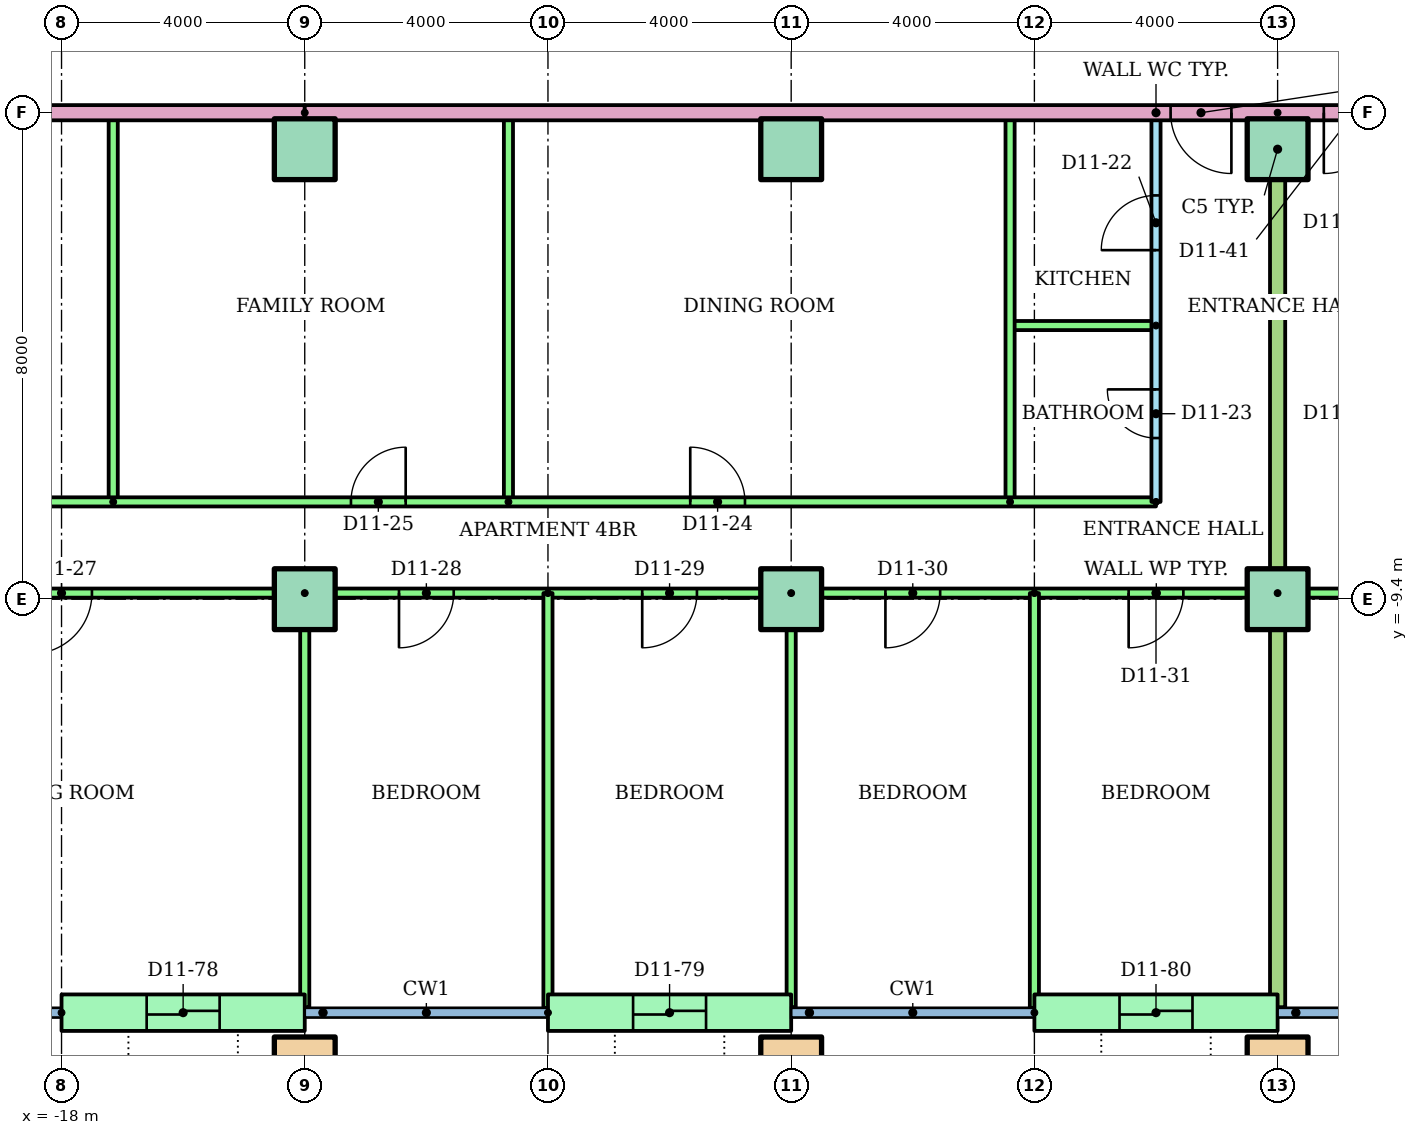
"""IFC4 building model, lengths in metres.
Left out: names, types, materials, properties, quantities, classifications, styles, units other than length and angle.
Written with IfcOpenShell. Run it as: python <this file> out.ifc"""

import sys

from ifc_helpers import new_model, si_unit, direction, frame, frame_2d, origin, origin_2d, place, context, subcontext, project, spatial, rectangle, hollow_rectangle, extrude, element, fill, save


model = new_model("IFC4")
c1 = context("Model", 3, precision=1e-05, world=origin(), true_north=direction((0.0, 1.0)))
c2 = subcontext(c1, "Body", "Model", "MODEL_VIEW")
j1 = project(units=[si_unit("LENGTHUNIT", "METRE"), si_unit("PLANEANGLEUNIT", "RADIAN")], contexts=[c1])
p1 = place(None, origin())
s1 = spatial("IfcSite", under=j1, at=p1, CompositionType="ELEMENT")
p2 = place(p1, origin())
s2 = spatial("IfcBuilding", under=s1, at=p2, CompositionType="ELEMENT")
p3 = place(p2, frame((0.0, 0.0, 44.8)))
s3 = spatial("IfcBuildingStorey", under=s2, at=p3, CompositionType="ELEMENT", Elevation=44.8)
for number, where in (
    (1, (-14.0, -17.1, 0.0)),
    (2, (-6.0, -17.1, 0.0)),
    (3, (2.0, -17.1, 0.0)),
):
    element("IfcColumn", number, at=place(p3, frame(where)), inside=s3, PredefinedType="COLUMN", context=c2, shape_type="SweptSolid", body=[
        extrude(hollow_rectangle(XDim=1.0, YDim=1.0, WallThickness=0.05, at=origin_2d()), origin(), (0.0, 0.0, 1.0), 3.2),
    ])
for number, where in (
    (4, (-14.0, -9.4, 0.0)),
    (5, (-6.0, -9.4, 0.0)),
    (6, (2.0, -9.4, 0.0)),
    (7, (-14.0, -2.0, 0.0)),
    (8, (-6.0, -2.0, 0.0)),
    (9, (2.0, -2.0, 0.0)),
):
    element("IfcColumn", number, at=place(p3, frame(where)), inside=s3, PredefinedType="COLUMN", context=c2, shape_type="SweptSolid", body=[
        extrude(rectangle(XDim=1.0, YDim=1.0, at=origin_2d()), origin(), (0.0, 0.0, 1.0), 3.2),
    ])
p4 = place(p3, frame((-18.0, -16.2, 0.0)))
e10 = element("IfcWall", 10, at=p4, inside=s3, PredefinedType="STANDARD", context=c2, shape_type="SweptSolid", body=[
    extrude(rectangle(XDim=4.0, YDim=0.6, at=frame_2d((2.0, 0.0))), origin(), (0.0, 0.0, 1.0), 2.92),
])
p5 = place(p4, frame((1.4, 0.0, 0.0)))
e11 = element("IfcOpeningElement", 11, at=p5, cuts=e10, PredefinedType="OPENING", context=c2, shape_type="SweptSolid", body=[
    extrude(rectangle(XDim=1.2, YDim=2.1, at=frame_2d((0.6, 1.05))), frame((0.0, 0.31, 0.0), z_axis=(0.0, -1.0, 0.0), x_axis=(1.0, 0.0, 0.0)), (0.0, 0.0, 1.0), 0.62),
])
p6 = place(p3, frame((-10.0, -16.2, 0.0)))
e12 = element("IfcWall", 12, at=p6, inside=s3, PredefinedType="STANDARD", context=c2, shape_type="SweptSolid", body=[
    extrude(rectangle(XDim=4.0, YDim=0.6, at=frame_2d((2.0, 0.0))), origin(), (0.0, 0.0, 1.0), 2.92),
])
p7 = place(p6, frame((1.4, 0.0, 0.0)))
e13 = element("IfcOpeningElement", 13, at=p7, cuts=e12, PredefinedType="OPENING", context=c2, shape_type="SweptSolid", body=[
    extrude(rectangle(XDim=1.2, YDim=2.1, at=frame_2d((0.6, 1.05))), frame((0.0, 0.31, 0.0), z_axis=(0.0, -1.0, 0.0), x_axis=(1.0, 0.0, 0.0)), (0.0, 0.0, 1.0), 0.62),
])
p8 = place(p3, frame((-2.0, -16.2, 0.0)))
e14 = element("IfcWall", 14, at=p8, inside=s3, PredefinedType="STANDARD", context=c2, shape_type="SweptSolid", body=[
    extrude(rectangle(XDim=4.0, YDim=0.6, at=frame_2d((2.0, 0.0))), origin(), (0.0, 0.0, 1.0), 2.92),
])
p9 = place(p8, frame((1.4, 0.0, 0.0)))
e15 = element("IfcOpeningElement", 15, at=p9, cuts=e14, PredefinedType="OPENING", context=c2, shape_type="SweptSolid", body=[
    extrude(rectangle(XDim=1.2, YDim=2.1, at=frame_2d((0.6, 1.05))), frame((0.0, 0.31, 0.0), z_axis=(0.0, -1.0, 0.0), x_axis=(1.0, 0.0, 0.0)), (0.0, 0.0, 1.0), 0.62),
])
p10 = place(p3, frame((0.0, -7.8, 0.0), z_axis=(0.0, 0.0, 1.0), x_axis=(0.0, 1.0, 0.0)))
e16 = element("IfcWall", 16, at=p10, inside=s3, PredefinedType="PARTITIONING", context=c2, shape_type="SweptSolid", body=[
    extrude(rectangle(XDim=6.4, YDim=0.15, at=frame_2d((3.2, 0.0))), origin(), (0.0, 0.0, 1.0), 2.4),
])
p11 = place(p10, frame((4.14, 0.0, 0.0)))
e17 = element("IfcOpeningElement", 17, at=p11, cuts=e16, PredefinedType="OPENING", context=c2, shape_type="SweptSolid", body=[
    extrude(rectangle(XDim=0.9, YDim=2.1, at=frame_2d((0.45, 1.05))), frame((0.0, 0.085, 0.0), z_axis=(0.0, -1.0, 0.0), x_axis=(1.0, 0.0, 0.0)), (0.0, 0.0, 1.0), 0.17),
])
p12 = place(p10, frame((1.05, 0.0, 0.0)))
e18 = element("IfcOpeningElement", 18, at=p12, cuts=e16, PredefinedType="OPENING", context=c2, shape_type="SweptSolid", body=[
    extrude(rectangle(XDim=0.8, YDim=2.1, at=frame_2d((0.4, 1.05))), frame((0.0, 0.085, 0.0), z_axis=(0.0, -1.0, 0.0), x_axis=(1.0, 0.0, 0.0)), (0.0, 0.0, 1.0), 0.17),
])
p13 = place(p3, frame((0.0, -4.9, 0.0), z_axis=(0.0, 0.0, 1.0), x_axis=(-1.0, 0.0, 0.0)))
e19 = element("IfcWall", 19, at=p13, inside=s3, PredefinedType="PARTITIONING", context=c2, shape_type="SweptSolid", body=[
    extrude(rectangle(XDim=2.4, YDim=0.15, at=frame_2d((1.2, 0.0))), origin(), (0.0, 0.0, 1.0), 2.4),
])
for number, where, z_axis, x_axis in (
    (20, (-2.4, -7.8, 0.0), (0.0, 0.0, 1.0), (0.0, 1.0, 0.0)),
    (21, (-10.65, -7.8, 0.0), (0.0, 0.0, 1.0), (0.0, 1.0, 0.0)),
    (22, (-17.15, -7.8, 0.0), (0.0, 0.0, 1.0), (0.0, 1.0, 0.0)),
):
    element("IfcWall", number, at=place(p3, frame(where, z_axis=z_axis, x_axis=x_axis)), inside=s3, PredefinedType="PARTITIONING", context=c2, shape_type="SweptSolid", body=[
        extrude(rectangle(XDim=6.4, YDim=0.15, at=frame_2d((3.2, 0.0))), origin(), (0.0, 0.0, 1.0), 2.4),
    ])
p14 = place(p3, frame((-22.0, -7.8, 0.0)))
e23 = element("IfcWall", 23, at=p14, inside=s3, PredefinedType="PARTITIONING", context=c2, shape_type="SweptSolid", body=[
    extrude(rectangle(XDim=22.0, YDim=0.15, at=frame_2d((11.0, 0.0))), origin(), (0.0, 0.0, 1.0), 2.4),
])
p15 = place(p14, frame((14.34, 0.0, 0.0)))
e24 = element("IfcOpeningElement", 24, at=p15, cuts=e23, PredefinedType="OPENING", context=c2, shape_type="SweptSolid", body=[
    extrude(rectangle(XDim=0.9, YDim=2.1, at=frame_2d((0.45, 1.05))), frame((0.0, 0.085, 0.0), z_axis=(0.0, -1.0, 0.0), x_axis=(1.0, 0.0, 0.0)), (0.0, 0.0, 1.0), 0.17),
])
p16 = place(p14, frame((8.76, 0.0, 0.0)))
e25 = element("IfcOpeningElement", 25, at=p16, cuts=e23, PredefinedType="OPENING", context=c2, shape_type="SweptSolid", body=[
    extrude(rectangle(XDim=0.9, YDim=2.1, at=frame_2d((0.45, 1.05))), frame((0.0, 0.085, 0.0), z_axis=(0.0, -1.0, 0.0), x_axis=(1.0, 0.0, 0.0)), (0.0, 0.0, 1.0), 0.17),
])
p17 = place(p14, frame((1.975, 0.0, 0.0)))
e26 = element("IfcOpeningElement", 26, at=p17, cuts=e23, PredefinedType="OPENING", context=c2, shape_type="SweptSolid", body=[
    extrude(rectangle(XDim=0.9, YDim=2.1, at=frame_2d((0.45, 1.05))), frame((0.0, 0.085, 0.0), z_axis=(0.0, -1.0, 0.0), x_axis=(1.0, 0.0, 0.0)), (0.0, 0.0, 1.0), 0.17),
])
p18 = place(p3, frame((2.0, -9.3, 0.0), z_axis=(0.0, 0.0, 1.0), x_axis=(-1.0, 0.0, 0.0)))
e27 = element("IfcWall", 27, at=p18, inside=s3, PredefinedType="PARTITIONING", context=c2, shape_type="SweptSolid", body=[
    extrude(rectangle(XDim=24.0, YDim=0.15, at=frame_2d((12.0, 0.0))), origin(), (0.0, 0.0, 1.0), 2.4),
])
p19 = place(p18, frame((19.5, 0.0, 0.0)))
e28 = element("IfcOpeningElement", 28, at=p19, cuts=e27, PredefinedType="OPENING", context=c2, shape_type="SweptSolid", body=[
    extrude(rectangle(XDim=1.0, YDim=2.1, at=frame_2d((0.5, 1.05))), frame((0.0, 0.085, 0.0), z_axis=(0.0, -1.0, 0.0), x_axis=(1.0, 0.0, 0.0)), (0.0, 0.0, 1.0), 0.17),
])
p20 = place(p18, frame((13.55, 0.0, 0.0)))
e29 = element("IfcOpeningElement", 29, at=p20, cuts=e27, PredefinedType="OPENING", context=c2, shape_type="SweptSolid", body=[
    extrude(rectangle(XDim=0.9, YDim=2.1, at=frame_2d((0.45, 1.05))), frame((0.0, 0.085, 0.0), z_axis=(0.0, -1.0, 0.0), x_axis=(1.0, 0.0, 0.0)), (0.0, 0.0, 1.0), 0.17),
])
p21 = place(p18, frame((9.55, 0.0, 0.0)))
e30 = element("IfcOpeningElement", 30, at=p21, cuts=e27, PredefinedType="OPENING", context=c2, shape_type="SweptSolid", body=[
    extrude(rectangle(XDim=0.9, YDim=2.1, at=frame_2d((0.45, 1.05))), frame((0.0, 0.085, 0.0), z_axis=(0.0, -1.0, 0.0), x_axis=(1.0, 0.0, 0.0)), (0.0, 0.0, 1.0), 0.17),
])
p22 = place(p18, frame((5.55, 0.0, 0.0)))
e31 = element("IfcOpeningElement", 31, at=p22, cuts=e27, PredefinedType="OPENING", context=c2, shape_type="SweptSolid", body=[
    extrude(rectangle(XDim=0.9, YDim=2.1, at=frame_2d((0.45, 1.05))), frame((0.0, 0.085, 0.0), z_axis=(0.0, -1.0, 0.0), x_axis=(1.0, 0.0, 0.0)), (0.0, 0.0, 1.0), 0.17),
])
p23 = place(p18, frame((1.55, 0.0, 0.0)))
e32 = element("IfcOpeningElement", 32, at=p23, cuts=e27, PredefinedType="OPENING", context=c2, shape_type="SweptSolid", body=[
    extrude(rectangle(XDim=0.9, YDim=2.1, at=frame_2d((0.45, 1.05))), frame((0.0, 0.085, 0.0), z_axis=(0.0, -1.0, 0.0), x_axis=(1.0, 0.0, 0.0)), (0.0, 0.0, 1.0), 0.17),
])
p24 = place(p3, frame((-14.0, -9.3, 0.0), z_axis=(0.0, 0.0, 1.0), x_axis=(0.0, -1.0, 0.0)))
e33 = element("IfcWall", 33, at=p24, inside=s3, PredefinedType="PARTITIONING", context=c2, shape_type="SweptSolid", body=[
    extrude(rectangle(XDim=6.81, YDim=0.15, at=frame_2d((3.405, 0.0))), origin(), (0.0, 0.0, 1.0), 2.4),
])
p25 = place(p3, frame((-10.0, -9.3, 0.0), z_axis=(0.0, 0.0, 1.0), x_axis=(0.0, -1.0, 0.0)))
e34 = element("IfcWall", 34, at=p25, inside=s3, PredefinedType="PARTITIONING", context=c2, shape_type="SweptSolid", body=[
    extrude(rectangle(XDim=6.821, YDim=0.15, at=frame_2d((3.411, 0.0))), origin(), (0.0, 0.0, 1.0), 2.4),
])
p26 = place(p3, frame((-6.0, -9.3, 0.0), z_axis=(0.0, 0.0, 1.0), x_axis=(0.0, -1.0, 0.0)))
e35 = element("IfcWall", 35, at=p26, inside=s3, PredefinedType="PARTITIONING", context=c2, shape_type="SweptSolid", body=[
    extrude(rectangle(XDim=6.81, YDim=0.15, at=frame_2d((3.405, 0.0))), origin(), (0.0, 0.0, 1.0), 2.4),
])
p27 = place(p3, frame((-2.0, -9.3, 0.0), z_axis=(0.0, 0.0, 1.0), x_axis=(0.0, -1.0, 0.0)))
e36 = element("IfcWall", 36, at=p27, inside=s3, PredefinedType="PARTITIONING", context=c2, shape_type="SweptSolid", body=[
    extrude(rectangle(XDim=6.821, YDim=0.15, at=frame_2d((3.411, 0.0))), origin(), (0.0, 0.0, 1.0), 2.4),
])
p28 = place(p3, frame((18.0, -9.3, 0.0), z_axis=(0.0, 0.0, 1.0), x_axis=(-1.0, 0.0, 0.0)))
e37 = element("IfcWall", 37, at=p28, inside=s3, PredefinedType="PARTITIONING", context=c2, shape_type="SweptSolid", body=[
    extrude(rectangle(XDim=16.0, YDim=0.15, at=frame_2d((8.0, 0.0))), origin(), (0.0, 0.0, 1.0), 2.4),
])
p29 = place(p28, frame((11.5, 0.0, 0.0)))
e38 = element("IfcOpeningElement", 38, at=p29, cuts=e37, PredefinedType="OPENING", context=c2, shape_type="SweptSolid", body=[
    extrude(rectangle(XDim=1.0, YDim=2.1, at=frame_2d((0.5, 1.05))), frame((0.0, 0.085, 0.0), z_axis=(0.0, -1.0, 0.0), x_axis=(1.0, 0.0, 0.0)), (0.0, 0.0, 1.0), 0.17),
])
p30 = place(p28, frame((5.55, 0.0, 0.0)))
e39 = element("IfcOpeningElement", 39, at=p30, cuts=e37, PredefinedType="OPENING", context=c2, shape_type="SweptSolid", body=[
    extrude(rectangle(XDim=0.9, YDim=2.1, at=frame_2d((0.45, 1.05))), frame((0.0, 0.085, 0.0), z_axis=(0.0, -1.0, 0.0), x_axis=(1.0, 0.0, 0.0)), (0.0, 0.0, 1.0), 0.17),
])
p31 = place(p28, frame((1.55, 0.0, 0.0)))
e40 = element("IfcOpeningElement", 40, at=p31, cuts=e37, PredefinedType="OPENING", context=c2, shape_type="SweptSolid", body=[
    extrude(rectangle(XDim=0.9, YDim=2.1, at=frame_2d((0.45, 1.05))), frame((0.0, 0.085, 0.0), z_axis=(0.0, -1.0, 0.0), x_axis=(1.0, 0.0, 0.0)), (0.0, 0.0, 1.0), 0.17),
])
p32 = place(p3, frame((2.0, -1.4, 0.0), z_axis=(0.0, 0.0, 1.0), x_axis=(0.0, -1.0, 0.0)))
e41 = element("IfcWall", 41, at=p32, inside=s3, PredefinedType="PARTITIONING", context=c2, shape_type="SweptSolid", body=[
    extrude(rectangle(XDim=14.71, YDim=0.25, at=frame_2d((7.355, 0.0))), origin(), (0.0, 0.0, 1.0), 2.4),
])
p33 = place(p3, frame((-14.0, -1.4, 0.0), z_axis=(0.0, 0.0, 1.0), x_axis=(-1.0, 0.0, 0.0)))
e42 = element("IfcWall", 42, at=p33, inside=s3, PredefinedType="PARTITIONING", context=c2, shape_type="SweptSolid", body=[
    extrude(rectangle(XDim=15.0, YDim=0.25, at=frame_2d((7.5, 0.0))), origin(), (0.0, 0.0, 1.0), 2.4),
])
p34 = place(p33, frame((8.76, 0.0, 0.0)))
e43 = element("IfcOpeningElement", 43, at=p34, cuts=e42, PredefinedType="OPENING", context=c2, shape_type="SweptSolid", body=[
    extrude(rectangle(XDim=1.0, YDim=2.1, at=frame_2d((0.5, 1.05))), frame((0.0, 0.135, 0.0), z_axis=(0.0, -1.0, 0.0), x_axis=(1.0, 0.0, 0.0)), (0.0, 0.0, 1.0), 0.27),
])
p35 = place(p3, frame((14.0, -1.4, 0.0), z_axis=(0.0, 0.0, 1.0), x_axis=(-1.0, 0.0, 0.0)))
e44 = element("IfcWall", 44, at=p35, inside=s3, PredefinedType="PARTITIONING", context=c2, shape_type="SweptSolid", body=[
    extrude(rectangle(XDim=28.0, YDim=0.25, at=frame_2d((14.0, 0.0))), origin(), (0.0, 0.0, 1.0), 2.4),
])
p36 = place(p35, frame((12.76, 0.0, 0.0)))
e45 = element("IfcOpeningElement", 45, at=p36, cuts=e44, PredefinedType="OPENING", context=c2, shape_type="SweptSolid", body=[
    extrude(rectangle(XDim=1.0, YDim=2.1, at=frame_2d((0.5, 1.05))), frame((0.0, 0.135, 0.0), z_axis=(0.0, -1.0, 0.0), x_axis=(1.0, 0.0, 0.0)), (0.0, 0.0, 1.0), 0.27),
])
p37 = place(p35, frame((10.24, 0.0, 0.0)))
e46 = element("IfcOpeningElement", 46, at=p37, cuts=e44, PredefinedType="OPENING", context=c2, shape_type="SweptSolid", body=[
    extrude(rectangle(XDim=1.0, YDim=2.1, at=frame_2d((0.5, 1.05))), frame((0.0, 0.135, 0.0), z_axis=(0.0, -1.0, 0.0), x_axis=(1.0, 0.0, 0.0)), (0.0, 0.0, 1.0), 0.27),
])
p38 = place(p11, origin())
e47 = element("IfcDoor", 47, at=p38, inside=s3, OperationType="SINGLE_SWING_LEFT", PredefinedType="DOOR", context=c2, shape_type="SweptSolid", body=[
    extrude(rectangle(XDim=0.9, YDim=2.1, at=frame_2d((0.45, 1.05))), frame((0.0, 0.025, 0.0), z_axis=(0.0, -1.0, 0.0), x_axis=(1.0, 0.0, 0.0)), (0.0, 0.0, 1.0), 0.05),
])
fill(e17, e47)
p39 = place(p12, origin())
e48 = element("IfcDoor", 48, at=p39, inside=s3, OperationType="SINGLE_SWING_RIGHT", PredefinedType="DOOR", context=c2, shape_type="SweptSolid", body=[
    extrude(rectangle(XDim=0.8, YDim=2.1, at=frame_2d((0.4, 1.05))), frame((0.0, 0.025, 0.0), z_axis=(0.0, -1.0, 0.0), x_axis=(1.0, 0.0, 0.0)), (0.0, 0.0, 1.0), 0.05),
])
fill(e18, e48)
p40 = place(p15, origin())
e49 = element("IfcDoor", 49, at=p40, inside=s3, OperationType="SINGLE_SWING_LEFT", PredefinedType="DOOR", context=c2, shape_type="SweptSolid", body=[
    extrude(rectangle(XDim=0.9, YDim=2.1, at=frame_2d((0.45, 1.05))), frame((0.0, 0.025, 0.0), z_axis=(0.0, -1.0, 0.0), x_axis=(1.0, 0.0, 0.0)), (0.0, 0.0, 1.0), 0.05),
])
fill(e24, e49)
p41 = place(p16, origin())
e50 = element("IfcDoor", 50, at=p41, inside=s3, OperationType="SINGLE_SWING_RIGHT", PredefinedType="DOOR", context=c2, shape_type="SweptSolid", body=[
    extrude(rectangle(XDim=0.9, YDim=2.1, at=frame_2d((0.45, 1.05))), frame((0.0, 0.025, 0.0), z_axis=(0.0, -1.0, 0.0), x_axis=(1.0, 0.0, 0.0)), (0.0, 0.0, 1.0), 0.05),
])
fill(e25, e50)
p42 = place(p19, origin())
e51 = element("IfcDoor", 51, at=p42, inside=s3, OperationType="SINGLE_SWING_RIGHT", PredefinedType="DOOR", context=c2, shape_type="SweptSolid", body=[
    extrude(rectangle(XDim=1.0, YDim=2.1, at=frame_2d((0.5, 1.05))), frame((0.0, 0.025, 0.0), z_axis=(0.0, -1.0, 0.0), x_axis=(1.0, 0.0, 0.0)), (0.0, 0.0, 1.0), 0.05),
])
fill(e28, e51)
p43 = place(p20, origin())
e52 = element("IfcDoor", 52, at=p43, inside=s3, OperationType="SINGLE_SWING_RIGHT", PredefinedType="DOOR", context=c2, shape_type="SweptSolid", body=[
    extrude(rectangle(XDim=0.9, YDim=2.1, at=frame_2d((0.45, 1.05))), frame((0.0, 0.025, 0.0), z_axis=(0.0, -1.0, 0.0), x_axis=(1.0, 0.0, 0.0)), (0.0, 0.0, 1.0), 0.05),
])
fill(e29, e52)
p44 = place(p21, origin())
e53 = element("IfcDoor", 53, at=p44, inside=s3, OperationType="SINGLE_SWING_RIGHT", PredefinedType="DOOR", context=c2, shape_type="SweptSolid", body=[
    extrude(rectangle(XDim=0.9, YDim=2.1, at=frame_2d((0.45, 1.05))), frame((0.0, 0.025, 0.0), z_axis=(0.0, -1.0, 0.0), x_axis=(1.0, 0.0, 0.0)), (0.0, 0.0, 1.0), 0.05),
])
fill(e30, e53)
p45 = place(p22, origin())
e54 = element("IfcDoor", 54, at=p45, inside=s3, OperationType="SINGLE_SWING_RIGHT", PredefinedType="DOOR", context=c2, shape_type="SweptSolid", body=[
    extrude(rectangle(XDim=0.9, YDim=2.1, at=frame_2d((0.45, 1.05))), frame((0.0, 0.025, 0.0), z_axis=(0.0, -1.0, 0.0), x_axis=(1.0, 0.0, 0.0)), (0.0, 0.0, 1.0), 0.05),
])
fill(e31, e54)
p46 = place(p23, origin())
e55 = element("IfcDoor", 55, at=p46, inside=s3, OperationType="SINGLE_SWING_RIGHT", PredefinedType="DOOR", context=c2, shape_type="SweptSolid", body=[
    extrude(rectangle(XDim=0.9, YDim=2.1, at=frame_2d((0.45, 1.05))), frame((0.0, 0.025, 0.0), z_axis=(0.0, -1.0, 0.0), x_axis=(1.0, 0.0, 0.0)), (0.0, 0.0, 1.0), 0.05),
])
fill(e32, e55)
p47 = place(p36, origin())
e56 = element("IfcDoor", 56, at=p47, inside=s3, OperationType="SINGLE_SWING_LEFT", PredefinedType="DOOR", context=c2, shape_type="SweptSolid", body=[
    extrude(rectangle(XDim=1.0, YDim=2.1, at=frame_2d((0.5, 1.05))), frame((0.0, 0.025, 0.0), z_axis=(0.0, -1.0, 0.0), x_axis=(1.0, 0.0, 0.0)), (0.0, 0.0, 1.0), 0.05),
])
fill(e45, e56)
p48 = place(p37, origin())
e57 = element("IfcDoor", 57, at=p48, inside=s3, OperationType="SINGLE_SWING_RIGHT", PredefinedType="DOOR", context=c2, shape_type="SweptSolid", body=[
    extrude(rectangle(XDim=1.0, YDim=2.1, at=frame_2d((0.5, 1.05))), frame((0.0, 0.025, 0.0), z_axis=(0.0, -1.0, 0.0), x_axis=(1.0, 0.0, 0.0)), (0.0, 0.0, 1.0), 0.05),
])
fill(e46, e57)
p49 = place(p5, origin())
e58 = element("IfcDoor", 58, at=p49, inside=s3, OperationType="SLIDING_TO_LEFT", PredefinedType="DOOR", context=c2, shape_type="SweptSolid", body=[
    extrude(rectangle(XDim=1.2, YDim=2.1, at=frame_2d((0.6, 1.05))), frame((0.0, 0.025, 0.0), z_axis=(0.0, -1.0, 0.0), x_axis=(1.0, 0.0, 0.0)), (0.0, 0.0, 1.0), 0.05),
])
fill(e11, e58)
p50 = place(p7, origin())
e59 = element("IfcDoor", 59, at=p50, inside=s3, OperationType="SLIDING_TO_LEFT", PredefinedType="DOOR", context=c2, shape_type="SweptSolid", body=[
    extrude(rectangle(XDim=1.2, YDim=2.1, at=frame_2d((0.6, 1.05))), frame((0.0, 0.025, 0.0), z_axis=(0.0, -1.0, 0.0), x_axis=(1.0, 0.0, 0.0)), (0.0, 0.0, 1.0), 0.05),
])
fill(e13, e59)
p51 = place(p9, origin())
e60 = element("IfcDoor", 60, at=p51, inside=s3, OperationType="SLIDING_TO_LEFT", PredefinedType="DOOR", context=c2, shape_type="SweptSolid", body=[
    extrude(rectangle(XDim=1.2, YDim=2.1, at=frame_2d((0.6, 1.05))), frame((0.0, 0.025, 0.0), z_axis=(0.0, -1.0, 0.0), x_axis=(1.0, 0.0, 0.0)), (0.0, 0.0, 1.0), 0.05),
])
fill(e15, e60)
save(model, sys.argv[1])
